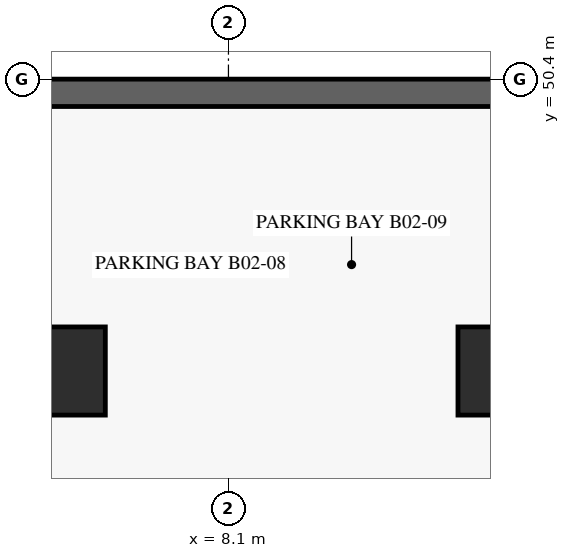
"""IFC4 building model, lengths in metres.
Left out: names, types, materials, properties, quantities, classifications, styles, units other than length and angle.
Written with IfcOpenShell. Run it as: python <this file> out.ifc"""

import sys

from ifc_helpers import new_model, si_unit, direction, frame, frame_2d, origin, origin_2d, place, context, subcontext, project, spatial, rectangle, extrude, source, transform, mapped, element, save


model = new_model("IFC4")
c1 = context("Model", 3, precision=1e-05, world=origin(), true_north=direction((0.0, 1.0)))
c2 = subcontext(c1, "Body", "Model", "MODEL_VIEW")
j1 = project(units=[si_unit("LENGTHUNIT", "METRE"), si_unit("PLANEANGLEUNIT", "RADIAN")], contexts=[c1])
p1 = place(None, origin())
s1 = spatial("IfcSite", under=j1, at=p1, CompositionType="ELEMENT")
p2 = place(p1, origin())
s2 = spatial("IfcBuilding", under=s1, at=p2, CompositionType="ELEMENT")
p3 = place(p2, frame((0.0, 0.0, -7.2)))
s3 = spatial("IfcBuildingStorey", under=s2, at=p3, CompositionType="ELEMENT", Elevation=-7.2)
p4 = place(p3, frame((64.575, 50.175, -0.36), z_axis=(0.0, 0.0, 1.0), x_axis=(-1.0, 0.0, 0.0)))
e1 = element("IfcWall", 1, at=p4, inside=s3, PredefinedType="USERDEFINED", context=c2, shape_type="SweptSolid", body=[
    extrude(rectangle(XDim=64.35, YDim=0.45, at=frame_2d((32.175, 0.0))), origin(), (0.0, 0.0, 1.0), 3.598),
])
m1 = source(origin(), c2, "Body", "SweptSolid", [
    extrude(rectangle(XDim=1.45, YDim=1.45, at=origin_2d()), origin(), (0.0, 0.0, 1.0), 3.6),
])
for number, where, z_axis, x_axis in (
    (2, (12.6, 45.6, -0.36), (0.0, 0.0, 1.0), (1.0, 0.0, 0.0)),
    (3, (5.35, 45.6, -0.36), (0.0, 0.0, 1.0), (1.0, 0.0, 0.0)),
):
    element("IfcColumn", number, at=place(p3, frame(where, z_axis=z_axis, x_axis=x_axis)), inside=s3, PredefinedType="COLUMN", context=c2, shape_type="MappedRepresentation", body=[
        mapped(m1, transform((0.0, 0.0, 0.0), scale=1.0)),
    ])
save(model, sys.argv[1])
